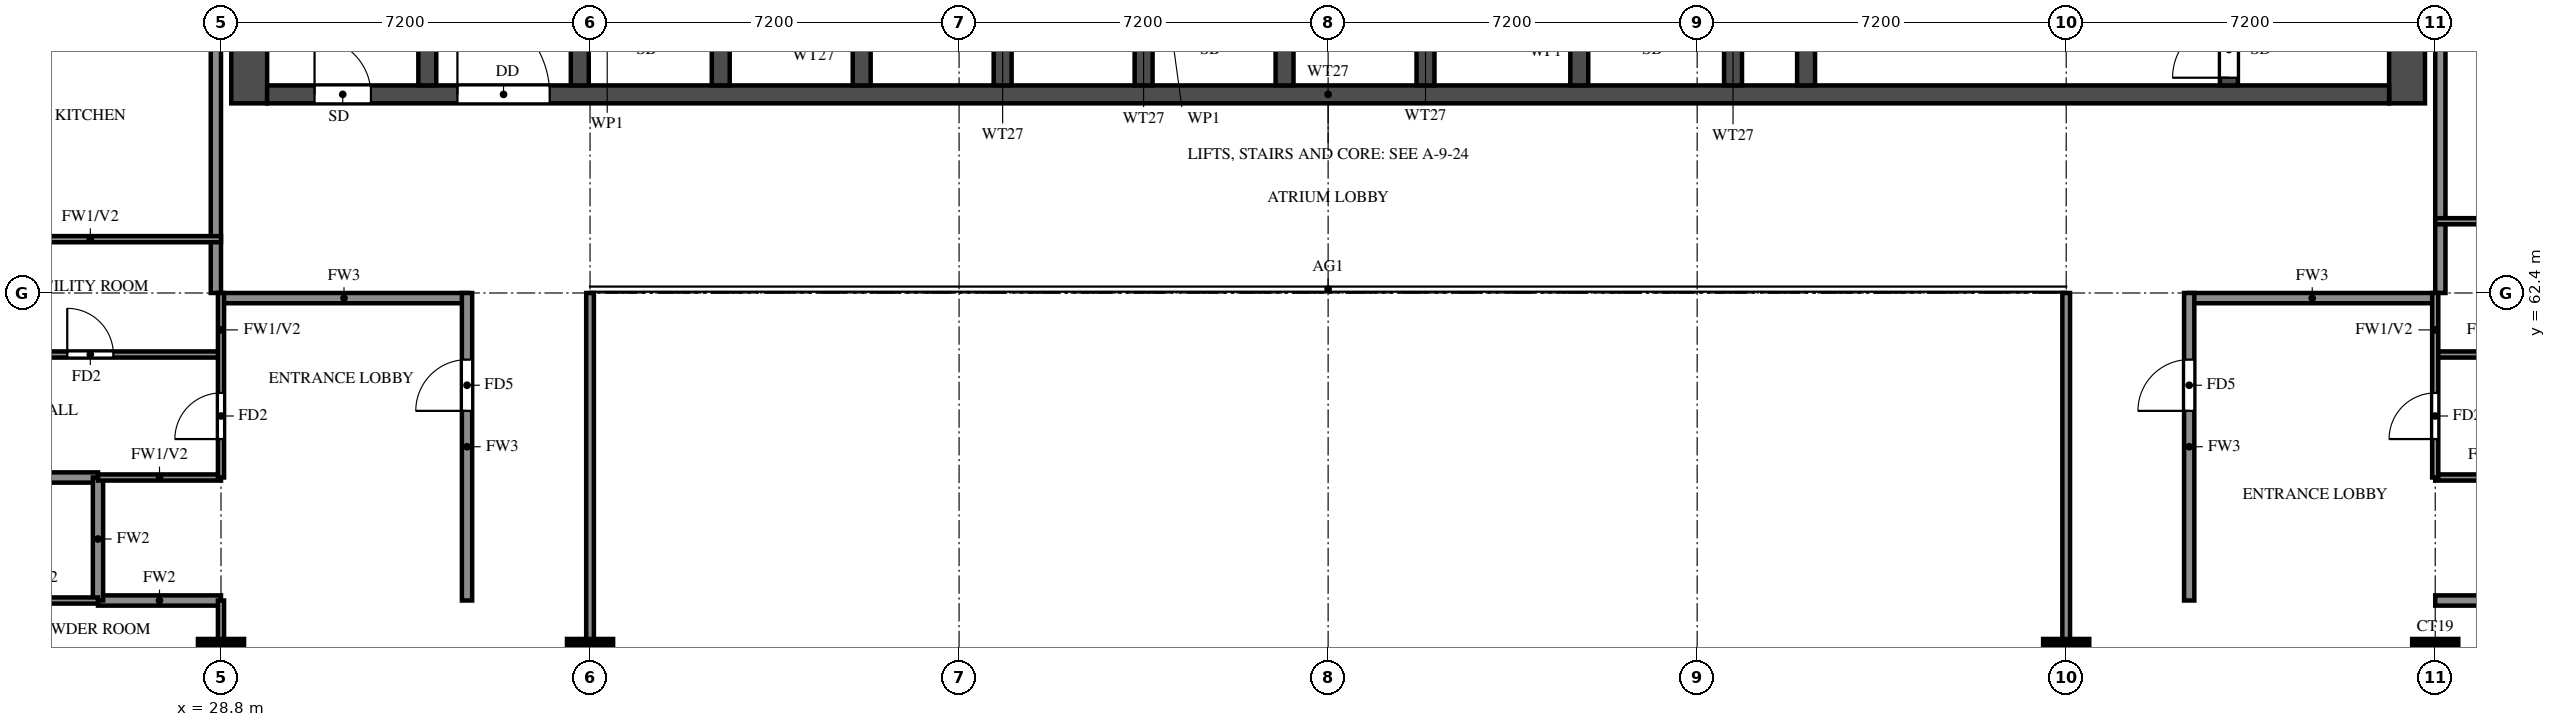
"""IFC4 building model, lengths in metres.
Left out: names, types, materials, properties, quantities, classifications, styles, units other than length and angle.
Written with IfcOpenShell. Run it as: python <this file> out.ifc"""

import sys

from ifc_helpers import new_model, si_unit, direction, frame, frame_2d, origin, origin_2d, place, context, subcontext, project, spatial, rectangle, extrude, source, transform, mapped, element, fill, save


model = new_model("IFC4")
c1 = context("Model", 3, precision=1e-05, world=origin(), true_north=direction((0.0, 1.0)))
c2 = subcontext(c1, "Body", "Model", "MODEL_VIEW")
j1 = project(units=[si_unit("LENGTHUNIT", "METRE"), si_unit("PLANEANGLEUNIT", "RADIAN")], contexts=[c1])
p1 = place(None, origin())
s1 = spatial("IfcSite", under=j1, at=p1, CompositionType="ELEMENT")
p2 = place(p1, origin())
s2 = spatial("IfcBuilding", under=s1, at=p2, CompositionType="ELEMENT")
p3 = place(p2, frame((0.0, 0.0, 174.5)))
s3 = spatial("IfcBuildingStorey", under=s2, at=p3, CompositionType="ELEMENT", Elevation=174.5)
m1 = source(origin(), c2, "Body", "SweptSolid", [
    extrude(rectangle(XDim=0.9, YDim=0.9, at=origin_2d()), origin(), (0.0, 0.0, 1.0), 3.2),
])
for number, where, z_axis, x_axis in (
    (1, (28.8, 55.2, 0.0), (0.0, 0.0, 1.0), (1.0, 0.0, 0.0)),
    (2, (36.0, 55.2, 0.0), (0.0, 0.0, 1.0), (1.0, 0.0, 0.0)),
    (3, (64.8, 55.2, 0.0), (0.0, 0.0, 1.0), (1.0, 0.0, 0.0)),
    (4, (72.0, 55.2, 0.0), (0.0, 0.0, 1.0), (1.0, 0.0, 0.0)),
):
    element("IfcColumn", number, at=place(p3, frame(where, z_axis=z_axis, x_axis=x_axis)), inside=s3, PredefinedType="COLUMN", context=c2, shape_type="MappedRepresentation", body=[
        mapped(m1, transform((0.0, 0.0, 0.0))),
    ])
for number, where, z_axis, x_axis in (
    (5, (29.35, 66.1, 0.0), (0.0, 0.0, 1.0), (0.0, 1.0, 0.0)),
    (6, (71.45, 66.1, 0.0), (0.0, 0.0, 1.0), (0.0, 1.0, 0.0)),
):
    element("IfcWall", number, at=place(p3, frame(where, z_axis=z_axis, x_axis=x_axis)), inside=s3, PredefinedType="SHEAR", context=c2, shape_type="SweptSolid", body=[
        extrude(rectangle(XDim=11.9, YDim=0.7, at=frame_2d((5.95, 0.0))), origin(), (0.0, 0.0, 1.0), 3.2),
    ])
p4 = place(p3, frame((29.7, 66.275, 0.0), z_axis=(0.0, 0.0, 1.0), x_axis=(1.0, 0.0, 0.0)))
e7 = element("IfcWall", 7, at=p4, inside=s3, PredefinedType="SHEAR", context=c2, shape_type="SweptSolid", body=[
    extrude(rectangle(XDim=41.4, YDim=0.35, at=frame_2d((20.7, 0.0))), origin(), (0.0, 0.0, 1.0), 3.2),
])
p5 = place(p4, frame((0.925, 0.0, 0.0)))
e8 = element("IfcOpeningElement", 8, at=p5, cuts=e7, PredefinedType="OPENING", context=c2, shape_type="SweptSolid", body=[
    extrude(rectangle(XDim=1.1, YDim=2.1, at=frame_2d((0.55, 1.05))), frame((0.0, 0.185, 0.0), z_axis=(0.0, -1.0, 0.0), x_axis=(1.0, 0.0, 0.0)), (0.0, 0.0, 1.0), 0.37),
])
p6 = place(p4, frame((3.712, 0.0, 0.0)))
e9 = element("IfcOpeningElement", 9, at=p6, cuts=e7, PredefinedType="OPENING", context=c2, shape_type="SweptSolid", body=[
    extrude(rectangle(XDim=1.8, YDim=2.1, at=frame_2d((0.9, 1.05))), frame((0.0, 0.185, 0.0), z_axis=(0.0, -1.0, 0.0), x_axis=(1.0, 0.0, 0.0)), (0.0, 0.0, 1.0), 0.37),
])
p7 = place(p3, frame((32.825, 66.45, 0.0), z_axis=(0.0, 0.0, 1.0), x_axis=(0.0, 1.0, 0.0)))
e10 = element("IfcWall", 10, at=p7, inside=s3, PredefinedType="SHEAR", context=c2, shape_type="SweptSolid", body=[
    extrude(rectangle(XDim=10.85, YDim=0.35, at=frame_2d((5.425, 0.0))), origin(), (0.0, 0.0, 1.0), 3.2),
])
p8 = place(p3, frame((67.975, 66.45, 0.0), z_axis=(0.0, 0.0, 1.0), x_axis=(0.0, 1.0, 0.0)))
e11 = element("IfcWall", 11, at=p8, inside=s3, PredefinedType="SHEAR", context=c2, shape_type="SweptSolid", body=[
    extrude(rectangle(XDim=10.85, YDim=0.35, at=frame_2d((5.425, 0.0))), origin(), (0.0, 0.0, 1.0), 3.2),
])
p9 = place(p8, frame((0.15, 0.0, 0.0)))
e12 = element("IfcOpeningElement", 12, at=p9, cuts=e11, PredefinedType="OPENING", context=c2, shape_type="SweptSolid", body=[
    extrude(rectangle(XDim=1.1, YDim=2.1, at=frame_2d((0.55, 1.05))), frame((0.0, 0.185, 0.0), z_axis=(0.0, -1.0, 0.0), x_axis=(1.0, 0.0, 0.0)), (0.0, 0.0, 1.0), 0.37),
])
p10 = place(p3, frame((59.725, 66.45, 0.0), z_axis=(0.0, 0.0, 1.0), x_axis=(0.0, 1.0, 0.0)))
e13 = element("IfcWall", 13, at=p10, inside=s3, PredefinedType="SHEAR", context=c2, shape_type="SweptSolid", body=[
    extrude(rectangle(XDim=6.125, YDim=0.35, at=frame_2d((3.062, 0.0))), origin(), (0.0, 0.0, 1.0), 3.2),
])
p11 = place(p10, frame((3.85, 0.0, 0.0)))
e14 = element("IfcOpeningElement", 14, at=p11, cuts=e13, PredefinedType="OPENING", context=c2, shape_type="SweptSolid", body=[
    extrude(rectangle(XDim=1.2, YDim=2.1, at=frame_2d((0.6, 1.05))), frame((0.0, 0.185, 0.0), z_axis=(0.0, -1.0, 0.0), x_axis=(1.0, 0.0, 0.0)), (0.0, 0.0, 1.0), 0.37),
])
for number, where, z_axis, x_axis in (
    (15, (35.8, 66.45, 0.0), (0.0, 0.0, 1.0), (0.0, 1.0, 0.0)),
    (16, (38.55, 66.45, 0.0), (0.0, 0.0, 1.0), (0.0, 1.0, 0.0)),
    (17, (41.3, 66.45, 0.0), (0.0, 0.0, 1.0), (0.0, 1.0, 0.0)),
    (18, (44.05, 66.45, 0.0), (0.0, 0.0, 1.0), (0.0, 1.0, 0.0)),
    (19, (46.8, 66.45, 0.0), (0.0, 0.0, 1.0), (0.0, 1.0, 0.0)),
    (20, (49.55, 66.45, 0.0), (0.0, 0.0, 1.0), (0.0, 1.0, 0.0)),
    (21, (52.3, 66.45, 0.0), (0.0, 0.0, 1.0), (0.0, 1.0, 0.0)),
    (22, (55.3, 66.45, 0.0), (0.0, 0.0, 1.0), (0.0, 1.0, 0.0)),
    (23, (58.3, 66.45, 0.0), (0.0, 0.0, 1.0), (0.0, 1.0, 0.0)),
):
    element("IfcWall", number, at=place(p3, frame(where, z_axis=z_axis, x_axis=x_axis)), inside=s3, PredefinedType="SHEAR", context=c2, shape_type="SweptSolid", body=[
        extrude(rectangle(XDim=2.425, YDim=0.35, at=frame_2d((1.212, 0.0))), origin(), (0.0, 0.0, 1.0), 3.2),
    ])
for number, where, z_axis, x_axis in (
    (24, (28.8, 62.3, 0.0), (0.0, 0.0, 1.0), (1.0, 0.0, 0.0)),
    (25, (67.2, 62.3, 0.0), (0.0, 0.0, 1.0), (1.0, 0.0, 0.0)),
):
    element("IfcWall", number, at=place(p3, frame(where, z_axis=z_axis, x_axis=x_axis)), inside=s3, PredefinedType="SOLIDWALL", context=c2, shape_type="SweptSolid", body=[
        extrude(rectangle(XDim=4.8, YDim=0.2, at=frame_2d((2.4, 0.0))), origin(), (0.0, 0.0, 1.0), 3.2),
    ])
p12 = place(p3, frame((28.7, 62.4, 0.0), z_axis=(0.0, 0.0, 1.0), x_axis=(0.0, 1.0, 0.0)))
e26 = element("IfcWall", 26, at=p12, inside=s3, PredefinedType="SOLIDWALL", context=c2, shape_type="SweptSolid", body=[
    extrude(rectangle(XDim=15.6, YDim=0.2, at=frame_2d((7.8, 0.0))), origin(), (0.0, 0.0, 1.0), 3.2),
])
p13 = place(p3, frame((33.6, 56.4, 0.0), z_axis=(0.0, 0.0, 1.0), x_axis=(0.0, 1.0, 0.0)))
e27 = element("IfcWall", 27, at=p13, inside=s3, PredefinedType="SOLIDWALL", context=c2, shape_type="SweptSolid", body=[
    extrude(rectangle(XDim=6.0, YDim=0.2, at=frame_2d((3.0, 0.0))), origin(), (0.0, 0.0, 1.0), 3.2),
])
p14 = place(p13, frame((3.7, 0.0, 0.0)))
e28 = element("IfcOpeningElement", 28, at=p14, cuts=e27, PredefinedType="OPENING", context=c2, shape_type="SweptSolid", body=[
    extrude(rectangle(XDim=1.0, YDim=2.1, at=frame_2d((0.5, 1.05))), frame((0.0, 0.11, 0.0), z_axis=(0.0, -1.0, 0.0), x_axis=(1.0, 0.0, 0.0)), (0.0, 0.0, 1.0), 0.22),
])
p15 = place(p3, frame((67.2, 56.4, 0.0), z_axis=(0.0, 0.0, 1.0), x_axis=(0.0, 1.0, 0.0)))
e29 = element("IfcWall", 29, at=p15, inside=s3, PredefinedType="SOLIDWALL", context=c2, shape_type="SweptSolid", body=[
    extrude(rectangle(XDim=6.0, YDim=0.2, at=frame_2d((3.0, 0.0))), origin(), (0.0, 0.0, 1.0), 3.2),
])
p16 = place(p15, frame((3.7, 0.0, 0.0)))
e30 = element("IfcOpeningElement", 30, at=p16, cuts=e29, PredefinedType="OPENING", context=c2, shape_type="SweptSolid", body=[
    extrude(rectangle(XDim=1.0, YDim=2.1, at=frame_2d((0.5, 1.05))), frame((0.0, 0.11, 0.0), z_axis=(0.0, -1.0, 0.0), x_axis=(1.0, 0.0, 0.0)), (0.0, 0.0, 1.0), 0.22),
])
p17 = place(p3, frame((72.1, 62.4, 0.0), z_axis=(0.0, 0.0, 1.0), x_axis=(0.0, 1.0, 0.0)))
e31 = element("IfcWall", 31, at=p17, inside=s3, PredefinedType="SOLIDWALL", context=c2, shape_type="SweptSolid", body=[
    extrude(rectangle(XDim=15.6, YDim=0.2, at=frame_2d((7.8, 0.0))), origin(), (0.0, 0.0, 1.0), 3.2),
])
p18 = place(p3, frame((26.4, 56.4, 0.0), z_axis=(0.0, 0.0, 1.0), x_axis=(1.0, 0.0, 0.0)))
e32 = element("IfcWall", 32, at=p18, inside=s3, PredefinedType="SOLIDWALL", context=c2, shape_type="SweptSolid", body=[
    extrude(rectangle(XDim=2.4, YDim=0.2, at=frame_2d((1.2, 0.0))), origin(), (0.0, 0.0, 1.0), 3.2),
])
p19 = place(p3, frame((72.0, 56.4, 0.0), z_axis=(0.0, 0.0, 1.0), x_axis=(1.0, 0.0, 0.0)))
e33 = element("IfcWall", 33, at=p19, inside=s3, PredefinedType="SOLIDWALL", context=c2, shape_type="SweptSolid", body=[
    extrude(rectangle(XDim=2.4, YDim=0.2, at=frame_2d((1.2, 0.0))), origin(), (0.0, 0.0, 1.0), 3.2),
])
p20 = place(p3, frame((14.525, 58.8, 0.0), z_axis=(0.0, 0.0, 1.0), x_axis=(1.0, 0.0, 0.0)))
e34 = element("IfcWall", 34, at=p20, inside=s3, PredefinedType="SOLIDWALL", context=c2, shape_type="SweptSolid", body=[
    extrude(rectangle(XDim=11.875, YDim=0.2, at=frame_2d((5.938, 0.0))), origin(), (0.0, 0.0, 1.0), 2.3),
])
p21 = place(p3, frame((26.4, 56.4, 0.0), z_axis=(0.0, 0.0, 1.0), x_axis=(0.0, 1.0, 0.0)))
e35 = element("IfcWall", 35, at=p21, inside=s3, PredefinedType="SOLIDWALL", context=c2, shape_type="SweptSolid", body=[
    extrude(rectangle(XDim=2.4, YDim=0.2, at=frame_2d((1.2, 0.0))), origin(), (0.0, 0.0, 1.0), 3.2),
])
p22 = place(p3, frame((23.7, 56.4, 0.0), z_axis=(0.0, 0.0, 1.0), x_axis=(1.0, 0.0, 0.0)))
e36 = element("IfcWall", 36, at=p22, inside=s3, PredefinedType="PARTITIONING", context=c2, shape_type="SweptSolid", body=[
    extrude(rectangle(XDim=2.7, YDim=0.12, at=frame_2d((1.35, 0.0))), origin(), (0.0, 0.0, 1.0), 3.2),
])
p23 = place(p3, frame((26.4, 58.8, 0.0), z_axis=(0.0, 0.0, 1.0), x_axis=(1.0, 0.0, 0.0)))
e37 = element("IfcWall", 37, at=p23, inside=s3, PredefinedType="PARTITIONING", context=c2, shape_type="SweptSolid", body=[
    extrude(rectangle(XDim=2.4, YDim=0.12, at=frame_2d((1.2, 0.0))), origin(), (0.0, 0.0, 1.0), 3.2),
])
p24 = place(p3, frame((72.0, 58.8, 0.0), z_axis=(0.0, 0.0, 1.0), x_axis=(1.0, 0.0, 0.0)))
e38 = element("IfcWall", 38, at=p24, inside=s3, PredefinedType="PARTITIONING", context=c2, shape_type="SweptSolid", body=[
    extrude(rectangle(XDim=2.4, YDim=0.12, at=frame_2d((1.2, 0.0))), origin(), (0.0, 0.0, 1.0), 3.2),
])
p25 = place(p3, frame((23.7, 61.2, 0.0), z_axis=(0.0, 0.0, 1.0), x_axis=(1.0, 0.0, 0.0)))
e39 = element("IfcWall", 39, at=p25, inside=s3, PredefinedType="PARTITIONING", context=c2, shape_type="SweptSolid", body=[
    extrude(rectangle(XDim=5.1, YDim=0.12, at=frame_2d((2.55, 0.0))), origin(), (0.0, 0.0, 1.0), 3.2),
])
p26 = place(p25, frame((2.1, 0.0, 0.0)))
e40 = element("IfcOpeningElement", 40, at=p26, cuts=e39, PredefinedType="OPENING", context=c2, shape_type="SweptSolid", body=[
    extrude(rectangle(XDim=0.9, YDim=2.1, at=frame_2d((0.45, 1.05))), frame((0.0, 0.07, 0.0), z_axis=(0.0, -1.0, 0.0), x_axis=(1.0, 0.0, 0.0)), (0.0, 0.0, 1.0), 0.14),
])
p27 = place(p3, frame((72.0, 61.2, 0.0), z_axis=(0.0, 0.0, 1.0), x_axis=(1.0, 0.0, 0.0)))
e41 = element("IfcWall", 41, at=p27, inside=s3, PredefinedType="PARTITIONING", context=c2, shape_type="SweptSolid", body=[
    extrude(rectangle(XDim=5.1, YDim=0.12, at=frame_2d((2.55, 0.0))), origin(), (0.0, 0.0, 1.0), 3.2),
])
p28 = place(p27, frame((2.1, 0.0, 0.0)))
e42 = element("IfcOpeningElement", 42, at=p28, cuts=e41, PredefinedType="OPENING", context=c2, shape_type="SweptSolid", body=[
    extrude(rectangle(XDim=0.9, YDim=2.1, at=frame_2d((0.45, 1.05))), frame((0.0, 0.07, 0.0), z_axis=(0.0, -1.0, 0.0), x_axis=(1.0, 0.0, 0.0)), (0.0, 0.0, 1.0), 0.14),
])
for number, where, z_axis, x_axis in (
    (43, (23.7, 63.45, 0.0), (0.0, 0.0, 1.0), (1.0, 0.0, 0.0)),
    (44, (72.0, 63.8, 0.0), (0.0, 0.0, 1.0), (1.0, 0.0, 0.0)),
):
    element("IfcWall", number, at=place(p3, frame(where, z_axis=z_axis, x_axis=x_axis)), inside=s3, PredefinedType="PARTITIONING", context=c2, shape_type="SweptSolid", body=[
        extrude(rectangle(XDim=5.1, YDim=0.12, at=frame_2d((2.55, 0.0))), origin(), (0.0, 0.0, 1.0), 3.2),
    ])
p29 = place(p3, frame((28.8, 54.0, 0.0), z_axis=(0.0, 0.0, 1.0), x_axis=(0.0, 1.0, 0.0)))
e45 = element("IfcWall", 45, at=p29, inside=s3, PredefinedType="PARTITIONING", context=c2, shape_type="SweptSolid", body=[
    extrude(rectangle(XDim=2.4, YDim=0.12, at=frame_2d((1.2, 0.0))), origin(), (0.0, 0.0, 1.0), 3.2),
])
p30 = place(p3, frame((28.8, 58.8, 0.0), z_axis=(0.0, 0.0, 1.0), x_axis=(0.0, 1.0, 0.0)))
e46 = element("IfcWall", 46, at=p30, inside=s3, PredefinedType="PARTITIONING", context=c2, shape_type="SweptSolid", body=[
    extrude(rectangle(XDim=3.6, YDim=0.12, at=frame_2d((1.8, 0.0))), origin(), (0.0, 0.0, 1.0), 3.2),
])
p31 = place(p30, frame((0.75, 0.0, 0.0)))
e47 = element("IfcOpeningElement", 47, at=p31, cuts=e46, PredefinedType="OPENING", context=c2, shape_type="SweptSolid", body=[
    extrude(rectangle(XDim=0.9, YDim=2.1, at=frame_2d((0.45, 1.05))), frame((0.0, 0.07, 0.0), z_axis=(0.0, -1.0, 0.0), x_axis=(1.0, 0.0, 0.0)), (0.0, 0.0, 1.0), 0.14),
])
p32 = place(p3, frame((72.0, 58.8, 0.0), z_axis=(0.0, 0.0, 1.0), x_axis=(0.0, 1.0, 0.0)))
e48 = element("IfcWall", 48, at=p32, inside=s3, PredefinedType="PARTITIONING", context=c2, shape_type="SweptSolid", body=[
    extrude(rectangle(XDim=3.6, YDim=0.12, at=frame_2d((1.8, 0.0))), origin(), (0.0, 0.0, 1.0), 3.2),
])
p33 = place(p32, frame((0.75, 0.0, 0.0)))
e49 = element("IfcOpeningElement", 49, at=p33, cuts=e48, PredefinedType="OPENING", context=c2, shape_type="SweptSolid", body=[
    extrude(rectangle(XDim=0.9, YDim=2.1, at=frame_2d((0.45, 1.05))), frame((0.0, 0.07, 0.0), z_axis=(0.0, -1.0, 0.0), x_axis=(1.0, 0.0, 0.0)), (0.0, 0.0, 1.0), 0.14),
])
for number, where, z_axis, x_axis in (
    (50, (36.0, 48.0, 0.0), (0.0, 0.0, 1.0), (0.0, 1.0, 0.0)),
    (51, (64.8, 48.0, 0.0), (0.0, 0.0, 1.0), (0.0, 1.0, 0.0)),
):
    element("IfcWall", number, at=place(p3, frame(where, z_axis=z_axis, x_axis=x_axis)), inside=s3, PredefinedType="SOLIDWALL", context=c2, shape_type="SweptSolid", body=[
        extrude(rectangle(XDim=14.4, YDim=0.15, at=frame_2d((7.2, 0.0))), origin(), (0.0, 0.0, 1.0), 2.3),
    ])
p34 = place(p5, origin())
e52 = element("IfcDoor", 52, at=p34, inside=s3, OperationType="SINGLE_SWING_LEFT", PredefinedType="DOOR", context=c2, shape_type="SweptSolid", body=[
    extrude(rectangle(XDim=1.1, YDim=2.1, at=frame_2d((0.55, 1.05))), frame((0.0, 0.025, 0.0), z_axis=(0.0, -1.0, 0.0), x_axis=(1.0, 0.0, 0.0)), (0.0, 0.0, 1.0), 0.05),
])
fill(e8, e52)
p35 = place(p9, origin())
e53 = element("IfcDoor", 53, at=p35, inside=s3, OperationType="SINGLE_SWING_LEFT", PredefinedType="DOOR", context=c2, shape_type="SweptSolid", body=[
    extrude(rectangle(XDim=1.1, YDim=2.1, at=frame_2d((0.55, 1.05))), frame((0.0, 0.025, 0.0), z_axis=(0.0, -1.0, 0.0), x_axis=(1.0, 0.0, 0.0)), (0.0, 0.0, 1.0), 0.05),
])
fill(e12, e53)
p36 = place(p6, origin())
e54 = element("IfcDoor", 54, at=p36, inside=s3, OperationType="DOUBLE_DOOR_SINGLE_SWING", PredefinedType="DOOR", context=c2, shape_type="SweptSolid", body=[
    extrude(rectangle(XDim=1.8, YDim=2.1, at=frame_2d((0.9, 1.05))), frame((0.0, 0.025, 0.0), z_axis=(0.0, -1.0, 0.0), x_axis=(1.0, 0.0, 0.0)), (0.0, 0.0, 1.0), 0.05),
])
fill(e9, e54)
p37 = place(p31, origin())
e55 = element("IfcDoor", 55, at=p37, inside=s3, OperationType="SINGLE_SWING_LEFT", PredefinedType="DOOR", context=c2, shape_type="SweptSolid", body=[
    extrude(rectangle(XDim=0.9, YDim=2.1, at=frame_2d((0.45, 1.05))), frame((0.0, 0.025, 0.0), z_axis=(0.0, -1.0, 0.0), x_axis=(1.0, 0.0, 0.0)), (0.0, 0.0, 1.0), 0.05),
])
fill(e47, e55)
p38 = place(p14, origin())
e56 = element("IfcDoor", 56, at=p38, inside=s3, OperationType="SINGLE_SWING_RIGHT", PredefinedType="DOOR", context=c2, shape_type="SweptSolid", body=[
    extrude(rectangle(XDim=1.0, YDim=2.1, at=frame_2d((0.5, 1.05))), frame((0.0, 0.025, 0.0), z_axis=(0.0, -1.0, 0.0), x_axis=(1.0, 0.0, 0.0)), (0.0, 0.0, 1.0), 0.05),
])
fill(e28, e56)
p39 = place(p26, origin())
e57 = element("IfcDoor", 57, at=p39, inside=s3, OperationType="SINGLE_SWING_LEFT", PredefinedType="DOOR", context=c2, shape_type="SweptSolid", body=[
    extrude(rectangle(XDim=0.9, YDim=2.1, at=frame_2d((0.45, 1.05))), frame((0.0, 0.025, 0.0), z_axis=(0.0, -1.0, 0.0), x_axis=(1.0, 0.0, 0.0)), (0.0, 0.0, 1.0), 0.05),
])
fill(e40, e57)
p40 = place(p33, origin())
e58 = element("IfcDoor", 58, at=p40, inside=s3, OperationType="SINGLE_SWING_RIGHT", PredefinedType="DOOR", context=c2, shape_type="SweptSolid", body=[
    extrude(rectangle(XDim=0.9, YDim=2.1, at=frame_2d((0.45, 1.05))), frame((0.0, 0.025, 0.0), z_axis=(0.0, -1.0, 0.0), x_axis=(1.0, 0.0, 0.0)), (0.0, 0.0, 1.0), 0.05),
])
fill(e49, e58)
p41 = place(p16, origin())
e59 = element("IfcDoor", 59, at=p41, inside=s3, OperationType="SINGLE_SWING_LEFT", PredefinedType="DOOR", context=c2, shape_type="SweptSolid", body=[
    extrude(rectangle(XDim=1.0, YDim=2.1, at=frame_2d((0.5, 1.05))), frame((0.0, 0.025, 0.0), z_axis=(0.0, -1.0, 0.0), x_axis=(1.0, 0.0, 0.0)), (0.0, 0.0, 1.0), 0.05),
])
fill(e30, e59)
save(model, sys.argv[1])
